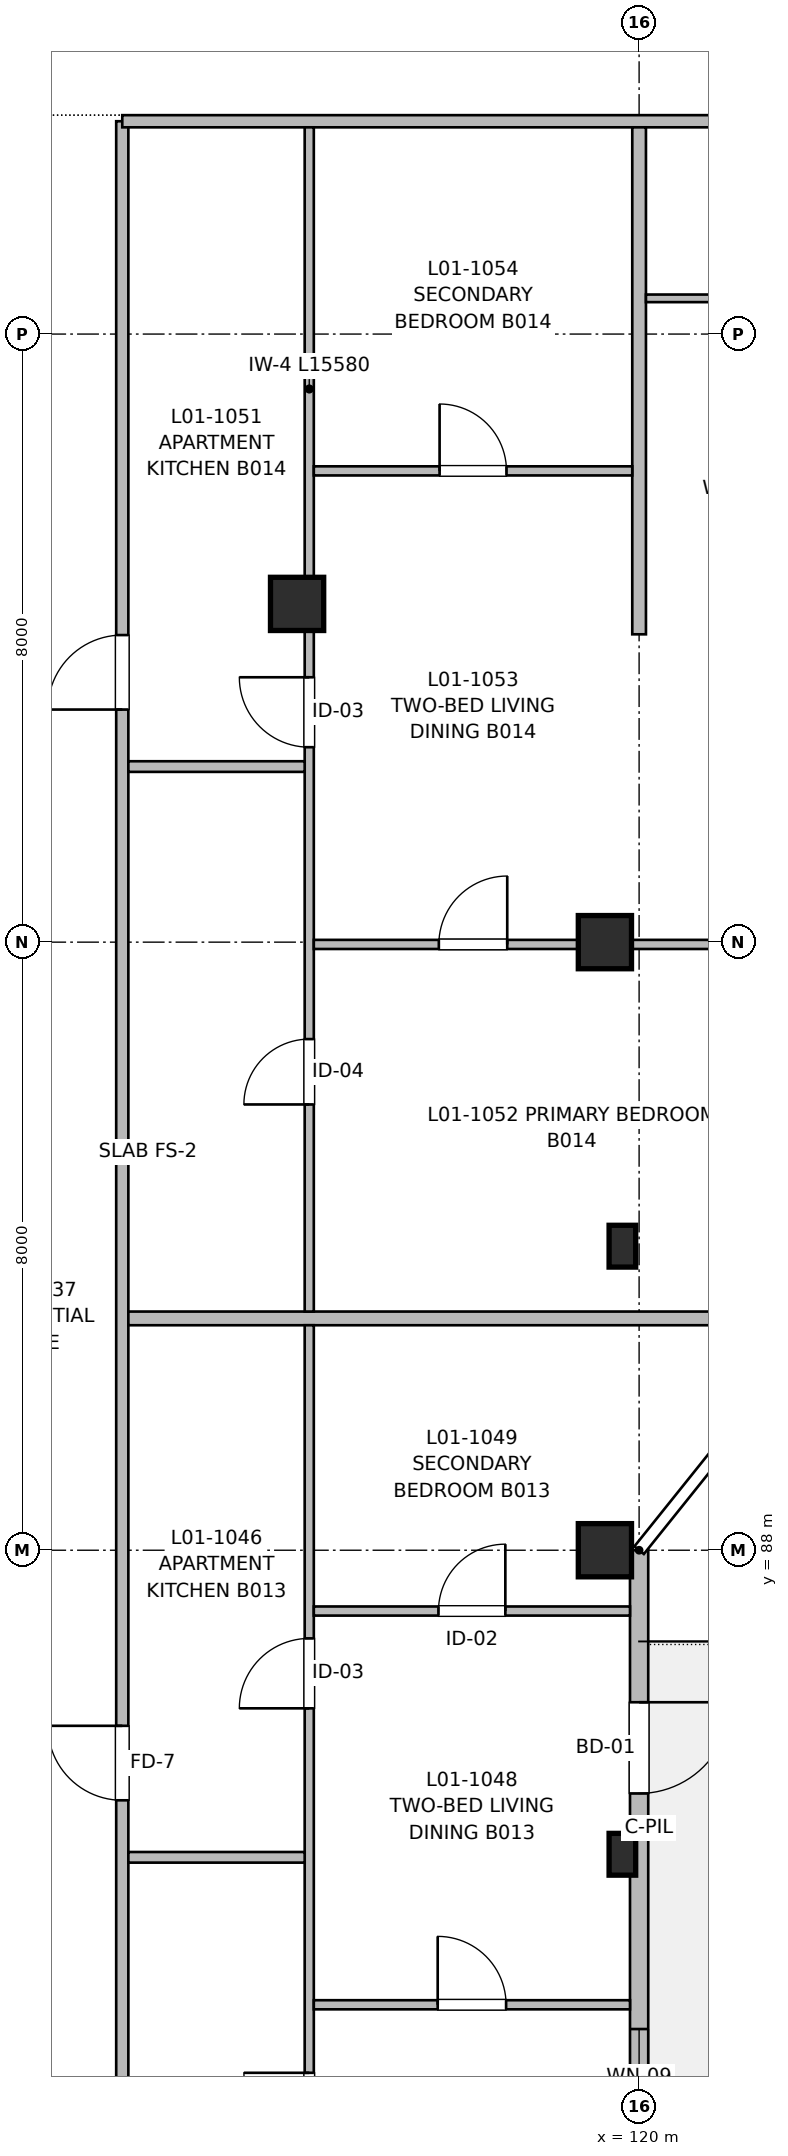
"""IFC4 building model, lengths in metres.
Left out: names, types, materials, properties, quantities, classifications, styles, units other than length and angle.
Written with IfcOpenShell. Run it as: python <this file> out.ifc"""

import sys

from ifc_helpers import new_model, si_unit, direction, frame, frame_2d, origin, origin_2d, place, context, subcontext, project, spatial, rectangle, extrude, element, fill, save


model = new_model("IFC4")
c1 = context("Model", 3, precision=1e-05, world=origin(), true_north=direction((0.0, 1.0)))
c2 = subcontext(c1, "Body", "Model", "MODEL_VIEW")
j1 = project(units=[si_unit("LENGTHUNIT", "METRE"), si_unit("PLANEANGLEUNIT", "RADIAN")], contexts=[c1])
p1 = place(None, origin())
s1 = spatial("IfcSite", under=j1, at=p1, CompositionType="ELEMENT")
p2 = place(p1, origin())
s2 = spatial("IfcBuilding", under=s1, at=p2, CompositionType="ELEMENT")
p3 = place(p2, frame((0.0, 0.0, 4.16)))
s3 = spatial("IfcBuildingStorey", under=s2, at=p3, CompositionType="ELEMENT", Elevation=4.16)
for number, where, z_axis, x_axis in (
    (1, (115.5, 100.45, 0.0), (0.0, 0.0, 1.0), (1.0, 0.0, 0.0)),
    (2, (119.55, 88.0, 0.0), (0.0, 0.0, 1.0), (1.0, 0.0, 0.0)),
    (3, (119.55, 96.0, 0.0), (0.0, 0.0, 1.0), (1.0, 0.0, 0.0)),
):
    element("IfcColumn", number, at=place(p3, frame(where, z_axis=z_axis, x_axis=x_axis)), inside=s3, PredefinedType="COLUMN", context=c2, shape_type="SweptSolid", body=[
        extrude(rectangle(XDim=0.7, YDim=0.7, at=origin_2d()), origin(), (0.0, 0.0, 1.0), 3.2),
    ])
for number, where, z_axis, x_axis in (
    (4, (119.78, 84.0, 0.0), (0.0, 0.0, 1.0), (1.0, 0.0, 0.0)),
    (5, (119.78, 92.0, 0.0), (0.0, 0.0, 1.0), (1.0, 0.0, 0.0)),
):
    element("IfcColumn", number, at=place(p3, frame(where, z_axis=z_axis, x_axis=x_axis)), inside=s3, PredefinedType="PILASTER", context=c2, shape_type="SweptSolid", body=[
        extrude(rectangle(XDim=0.35, YDim=0.55, at=origin_2d()), origin(), (0.0, 0.0, 1.0), 3.2),
    ])
p4 = place(p3, frame((120.0, 88.0, 0.0), z_axis=(0.0, 0.0, 1.0), x_axis=(0.0, -1.0, 0.0)))
e6 = element("IfcWall", 6, at=p4, inside=s3, PredefinedType="SOLIDWALL", context=c2, shape_type="SweptSolid", body=[
    extrude(rectangle(XDim=32.0, YDim=0.24, at=frame_2d((16.0, 0.0))), origin(), (0.0, 0.0, 1.0), 2.98),
])
p5 = place(p4, frame((2.0, 0.0, 0.0)))
e7 = element("IfcOpeningElement", 7, at=p5, cuts=e6, PredefinedType="OPENING", context=c2, shape_type="SweptSolid", body=[
    extrude(rectangle(XDim=1.2, YDim=2.2, at=frame_2d((0.6, 1.1))), frame((0.0, 0.13, 0.0), z_axis=(0.0, -1.0, 0.0), x_axis=(1.0, 0.0, 0.0)), (0.0, 0.0, 1.0), 0.26),
])
p6 = place(p4, frame((11.4, 0.0, 0.9)))
e8 = element("IfcOpeningElement", 8, at=p6, cuts=e6, PredefinedType="OPENING", context=c2, shape_type="SweptSolid", body=[
    extrude(rectangle(XDim=1.2, YDim=1.05, at=frame_2d((0.6, 0.525))), frame((0.0, 0.13, 0.0), z_axis=(0.0, -1.0, 0.0), x_axis=(1.0, 0.0, 0.0)), (0.0, 0.0, 1.0), 0.26),
])
p7 = place(p4, frame((19.675, 0.0, 0.9)))
e9 = element("IfcOpeningElement", 9, at=p7, cuts=e6, PredefinedType="OPENING", context=c2, shape_type="SweptSolid", body=[
    extrude(rectangle(XDim=0.65, YDim=0.95, at=frame_2d((0.325, 0.475))), frame((0.0, 0.13, 0.0), z_axis=(0.0, -1.0, 0.0), x_axis=(1.0, 0.0, 0.0)), (0.0, 0.0, 1.0), 0.26),
])
p8 = place(p4, frame((27.45, 0.0, 0.62)))
e10 = element("IfcOpeningElement", 10, at=p8, cuts=e6, PredefinedType="OPENING", context=c2, shape_type="SweptSolid", body=[
    extrude(rectangle(XDim=1.1, YDim=1.6, at=frame_2d((0.55, 0.8))), frame((0.0, 0.13, 0.0), z_axis=(0.0, -1.0, 0.0), x_axis=(1.0, 0.0, 0.0)), (0.0, 0.0, 1.0), 0.26),
])
p9 = place(p4, frame((6.299, 0.0, 0.87)))
e11 = element("IfcOpeningElement", 11, at=p9, cuts=e6, PredefinedType="OPENING", context=c2, shape_type="SweptSolid", body=[
    extrude(rectangle(XDim=1.25, YDim=1.35, at=frame_2d((0.625, 0.675))), frame((0.0, 0.13, 0.0), z_axis=(0.0, -1.0, 0.0), x_axis=(1.0, 0.0, 0.0)), (0.0, 0.0, 1.0), 0.26),
])
p10 = place(p3, frame((113.2, 56.18, 0.0), z_axis=(0.0, 0.0, 1.0), x_axis=(0.0, 1.0, 0.0)))
e12 = element("IfcWall", 12, at=p10, inside=s3, PredefinedType="PARTITIONING", context=c2, shape_type="SweptSolid", body=[
    extrude(rectangle(XDim=50.62, YDim=0.16, at=frame_2d((25.31, 0.0))), origin(), (0.0, 0.0, 1.0), 2.935),
])
p11 = place(p10, frame((4.51, 0.0, 0.0)))
e13 = element("IfcOpeningElement", 13, at=p11, cuts=e12, PredefinedType="OPENING", context=c2, shape_type="SweptSolid", body=[
    extrude(rectangle(XDim=1.5, YDim=2.2, at=frame_2d((0.75, 1.1))), frame((0.0, 0.09, 0.0), z_axis=(0.0, -1.0, 0.0), x_axis=(1.0, 0.0, 0.0)), (0.0, 0.0, 1.0), 0.18),
])
p12 = place(p10, frame((16.48, 0.0, 0.0)))
e14 = element("IfcOpeningElement", 14, at=p12, cuts=e12, PredefinedType="OPENING", context=c2, shape_type="SweptSolid", body=[
    extrude(rectangle(XDim=1.02, YDim=2.15, at=frame_2d((0.51, 1.075))), frame((0.0, 0.09, 0.0), z_axis=(0.0, -1.0, 0.0), x_axis=(1.0, 0.0, 0.0)), (0.0, 0.0, 1.0), 0.18),
])
p13 = place(p10, frame((28.53, 0.0, 0.0)))
e15 = element("IfcOpeningElement", 15, at=p13, cuts=e12, PredefinedType="OPENING", context=c2, shape_type="SweptSolid", body=[
    extrude(rectangle(XDim=0.98, YDim=2.15, at=frame_2d((0.49, 1.075))), frame((0.0, 0.09, 0.0), z_axis=(0.0, -1.0, 0.0), x_axis=(1.0, 0.0, 0.0)), (0.0, 0.0, 1.0), 0.18),
])
p14 = place(p10, frame((42.88, 0.0, 0.0)))
e16 = element("IfcOpeningElement", 16, at=p14, cuts=e12, PredefinedType="OPENING", context=c2, shape_type="SweptSolid", body=[
    extrude(rectangle(XDim=0.98, YDim=2.15, at=frame_2d((0.49, 1.075))), frame((0.0, 0.09, 0.0), z_axis=(0.0, -1.0, 0.0), x_axis=(1.0, 0.0, 0.0)), (0.0, 0.0, 1.0), 0.18),
])
p15 = place(p3, frame((113.2, 106.8, 0.0), z_axis=(0.0, 0.0, 1.0), x_axis=(1.0, 0.0, 0.0)))
e17 = element("IfcWall", 17, at=p15, inside=s3, PredefinedType="PARTITIONING", context=c2, shape_type="SweptSolid", body=[
    extrude(rectangle(XDim=24.12, YDim=0.16, at=frame_2d((12.06, 0.0))), origin(), (0.0, 0.0, 1.0), 2.935),
])
p16 = place(p15, frame((19.575, 0.0, 0.0)))
e18 = element("IfcOpeningElement", 18, at=p16, cuts=e17, PredefinedType="OPENING", context=c2, shape_type="SweptSolid", body=[
    extrude(rectangle(XDim=1.05, YDim=2.15, at=frame_2d((0.525, 1.075))), frame((0.0, 0.09, 0.0), z_axis=(0.0, -1.0, 0.0), x_axis=(1.0, 0.0, 0.0)), (0.0, 0.0, 1.0), 0.18),
])
p17 = place(p15, frame((8.995, 0.0, 0.0)))
e19 = element("IfcOpeningElement", 19, at=p17, cuts=e17, PredefinedType="OPENING", context=c2, shape_type="SweptSolid", body=[
    extrude(rectangle(XDim=0.98, YDim=2.15, at=frame_2d((0.49, 1.075))), frame((0.0, 0.09, 0.0), z_axis=(0.0, -1.0, 0.0), x_axis=(1.0, 0.0, 0.0)), (0.0, 0.0, 1.0), 0.18),
])
p18 = place(p3, frame((120.0, 100.05, 0.0), z_axis=(0.0, 0.0, 1.0), x_axis=(0.0, 1.0, 0.0)))
e20 = element("IfcWall", 20, at=p18, inside=s3, PredefinedType="PARTITIONING", context=c2, shape_type="SweptSolid", body=[
    extrude(rectangle(XDim=6.67, YDim=0.18, at=frame_2d((3.335, 0.0))), origin(), (0.0, 0.0, 1.0), 2.935),
])
p19 = place(p3, frame((113.28, 91.05, 0.0), z_axis=(0.0, 0.0, 1.0), x_axis=(1.0, 0.0, 0.0)))
e21 = element("IfcWall", 21, at=p19, inside=s3, PredefinedType="PARTITIONING", context=c2, shape_type="SweptSolid", body=[
    extrude(rectangle(XDim=9.115, YDim=0.18, at=frame_2d((4.558, 0.0))), origin(), (0.0, 0.0, 1.0), 2.935),
])
p20 = place(p3, frame((115.66, 78.0, 0.0), z_axis=(0.0, 0.0, 1.0), x_axis=(0.0, 1.0, 0.0)))
e22 = element("IfcWall", 22, at=p20, inside=s3, PredefinedType="PARTITIONING", context=c2, shape_type="SweptSolid", body=[
    extrude(rectangle(XDim=12.96, YDim=0.12, at=frame_2d((6.48, 0.0))), origin(), (0.0, 0.0, 1.0), 2.935),
])
p21 = place(p20, frame((2.265, 0.0, 0.0)))
e23 = element("IfcOpeningElement", 23, at=p21, cuts=e22, PredefinedType="OPENING", context=c2, shape_type="SweptSolid", body=[
    extrude(rectangle(XDim=0.86, YDim=2.1, at=frame_2d((0.43, 1.05))), frame((0.0, 0.07, 0.0), z_axis=(0.0, -1.0, 0.0), x_axis=(1.0, 0.0, 0.0)), (0.0, 0.0, 1.0), 0.14),
])
p22 = place(p20, frame((7.92, 0.0, 0.0)))
e24 = element("IfcOpeningElement", 24, at=p22, cuts=e22, PredefinedType="OPENING", context=c2, shape_type="SweptSolid", body=[
    extrude(rectangle(XDim=0.92, YDim=2.1, at=frame_2d((0.46, 1.05))), frame((0.0, 0.07, 0.0), z_axis=(0.0, -1.0, 0.0), x_axis=(1.0, 0.0, 0.0)), (0.0, 0.0, 1.0), 0.14),
])
p23 = place(p3, frame((113.28, 83.96, 0.0), z_axis=(0.0, 0.0, 1.0), x_axis=(1.0, 0.0, 0.0)))
e25 = element("IfcWall", 25, at=p23, inside=s3, PredefinedType="PARTITIONING", context=c2, shape_type="SweptSolid", body=[
    extrude(rectangle(XDim=2.32, YDim=0.14, at=frame_2d((1.16, 0.0))), origin(), (0.0, 0.0, 1.0), 2.935),
])
p24 = place(p3, frame((115.72, 82.02, 0.0), z_axis=(0.0, 0.0, 1.0), x_axis=(1.0, 0.0, 0.0)))
e26 = element("IfcWall", 26, at=p24, inside=s3, PredefinedType="PARTITIONING", context=c2, shape_type="SweptSolid", body=[
    extrude(rectangle(XDim=4.16, YDim=0.12, at=frame_2d((2.08, 0.0))), origin(), (0.0, 0.0, 1.0), 2.935),
])
p25 = place(p24, frame((1.63, 0.0, 0.0)))
e27 = element("IfcOpeningElement", 27, at=p25, cuts=e26, PredefinedType="OPENING", context=c2, shape_type="SweptSolid", body=[
    extrude(rectangle(XDim=0.9, YDim=2.1, at=frame_2d((0.45, 1.05))), frame((0.0, 0.07, 0.0), z_axis=(0.0, -1.0, 0.0), x_axis=(1.0, 0.0, 0.0)), (0.0, 0.0, 1.0), 0.14),
])
p26 = place(p3, frame((115.72, 87.2, 0.0), z_axis=(0.0, 0.0, 1.0), x_axis=(1.0, 0.0, 0.0)))
e28 = element("IfcWall", 28, at=p26, inside=s3, PredefinedType="PARTITIONING", context=c2, shape_type="SweptSolid", body=[
    extrude(rectangle(XDim=4.16, YDim=0.12, at=frame_2d((2.08, 0.0))), origin(), (0.0, 0.0, 1.0), 2.935),
])
p27 = place(p26, frame((1.64, 0.0, 0.0)))
e29 = element("IfcOpeningElement", 29, at=p27, cuts=e28, PredefinedType="OPENING", context=c2, shape_type="SweptSolid", body=[
    extrude(rectangle(XDim=0.88, YDim=2.1, at=frame_2d((0.44, 1.05))), frame((0.0, 0.07, 0.0), z_axis=(0.0, -1.0, 0.0), x_axis=(1.0, 0.0, 0.0)), (0.0, 0.0, 1.0), 0.14),
])
p28 = place(p3, frame((115.66, 91.14, 0.0), z_axis=(0.0, 0.0, 1.0), x_axis=(0.0, 1.0, 0.0)))
e30 = element("IfcWall", 30, at=p28, inside=s3, PredefinedType="PARTITIONING", context=c2, shape_type="SweptSolid", body=[
    extrude(rectangle(XDim=15.58, YDim=0.12, at=frame_2d((7.79, 0.0))), origin(), (0.0, 0.0, 1.0), 2.68),
])
p29 = place(p28, frame((2.725, 0.0, 0.0)))
e31 = element("IfcOpeningElement", 31, at=p29, cuts=e30, PredefinedType="OPENING", context=c2, shape_type="SweptSolid", body=[
    extrude(rectangle(XDim=0.86, YDim=2.1, at=frame_2d((0.43, 1.05))), frame((0.0, 0.07, 0.0), z_axis=(0.0, -1.0, 0.0), x_axis=(1.0, 0.0, 0.0)), (0.0, 0.0, 1.0), 0.14),
])
p30 = place(p28, frame((7.425, 0.0, 0.0)))
e32 = element("IfcOpeningElement", 32, at=p30, cuts=e30, PredefinedType="OPENING", context=c2, shape_type="SweptSolid", body=[
    extrude(rectangle(XDim=0.92, YDim=2.1, at=frame_2d((0.46, 1.05))), frame((0.0, 0.07, 0.0), z_axis=(0.0, -1.0, 0.0), x_axis=(1.0, 0.0, 0.0)), (0.0, 0.0, 1.0), 0.14),
])
p31 = place(p3, frame((113.28, 98.31, 0.0), z_axis=(0.0, 0.0, 1.0), x_axis=(1.0, 0.0, 0.0)))
e33 = element("IfcWall", 33, at=p31, inside=s3, PredefinedType="PARTITIONING", context=c2, shape_type="SweptSolid", body=[
    extrude(rectangle(XDim=2.32, YDim=0.14, at=frame_2d((1.16, 0.0))), origin(), (0.0, 0.0, 1.0), 2.935),
])
p32 = place(p3, frame((115.72, 95.97, 0.0), z_axis=(0.0, 0.0, 1.0), x_axis=(1.0, 0.0, 0.0)))
e34 = element("IfcWall", 34, at=p32, inside=s3, PredefinedType="PARTITIONING", context=c2, shape_type="SweptSolid", body=[
    extrude(rectangle(XDim=11.317, YDim=0.12, at=frame_2d((5.659, 0.0))), origin(), (0.0, 0.0, 1.0), 2.53),
])
p33 = place(p32, frame((1.645, 0.0, 0.0)))
e35 = element("IfcOpeningElement", 35, at=p33, cuts=e34, PredefinedType="OPENING", context=c2, shape_type="SweptSolid", body=[
    extrude(rectangle(XDim=0.9, YDim=2.1, at=frame_2d((0.45, 1.05))), frame((0.0, 0.07, 0.0), z_axis=(0.0, -1.0, 0.0), x_axis=(1.0, 0.0, 0.0)), (0.0, 0.0, 1.0), 0.14),
])
p34 = place(p3, frame((115.72, 102.2, 0.0), z_axis=(0.0, 0.0, 1.0), x_axis=(1.0, 0.0, 0.0)))
e36 = element("IfcWall", 36, at=p34, inside=s3, PredefinedType="PARTITIONING", context=c2, shape_type="SweptSolid", body=[
    extrude(rectangle(XDim=4.19, YDim=0.12, at=frame_2d((2.095, 0.0))), origin(), (0.0, 0.0, 1.0), 2.935),
])
p35 = place(p34, frame((1.655, 0.0, 0.0)))
e37 = element("IfcOpeningElement", 37, at=p35, cuts=e36, PredefinedType="OPENING", context=c2, shape_type="SweptSolid", body=[
    extrude(rectangle(XDim=0.88, YDim=2.1, at=frame_2d((0.44, 1.05))), frame((0.0, 0.07, 0.0), z_axis=(0.0, -1.0, 0.0), x_axis=(1.0, 0.0, 0.0)), (0.0, 0.0, 1.0), 0.14),
])
p36 = place(p3, frame((120.09, 104.47, 0.0), z_axis=(0.0, 0.0, 1.0), x_axis=(1.0, 0.0, 0.0)))
e38 = element("IfcWall", 38, at=p36, inside=s3, PredefinedType="PARTITIONING", context=c2, shape_type="SweptSolid", body=[
    extrude(rectangle(XDim=5.13, YDim=0.1, at=frame_2d((2.565, 0.0))), origin(), (0.0, 0.0, 1.0), 2.935),
])
p37 = place(p36, frame((2.18, 0.0, 0.0)))
e39 = element("IfcOpeningElement", 39, at=p37, cuts=e38, PredefinedType="OPENING", context=c2, shape_type="SweptSolid", body=[
    extrude(rectangle(XDim=0.92, YDim=2.1, at=frame_2d((0.46, 1.05))), frame((0.0, 0.06, 0.0), z_axis=(0.0, -1.0, 0.0), x_axis=(1.0, 0.0, 0.0)), (0.0, 0.0, 1.0), 0.12),
])
p38 = place(p5, origin())
e40 = element("IfcDoor", 40, at=p38, inside=s3, OperationType="SINGLE_SWING_LEFT", PredefinedType="DOOR", context=c2, shape_type="SweptSolid", body=[
    extrude(rectangle(XDim=1.2, YDim=2.2, at=frame_2d((0.6, 1.1))), frame((0.0, 0.025, 0.0), z_axis=(0.0, -1.0, 0.0), x_axis=(1.0, 0.0, 0.0)), (0.0, 0.0, 1.0), 0.05),
])
fill(e7, e40)
p39 = place(p21, origin())
e41 = element("IfcDoor", 41, at=p39, inside=s3, OperationType="SINGLE_SWING_RIGHT", PredefinedType="DOOR", context=c2, shape_type="SweptSolid", body=[
    extrude(rectangle(XDim=0.86, YDim=2.1, at=frame_2d((0.43, 1.05))), frame((0.0, 0.025, 0.0), z_axis=(0.0, -1.0, 0.0), x_axis=(1.0, 0.0, 0.0)), (0.0, 0.0, 1.0), 0.05),
])
fill(e23, e41)
p40 = place(p22, origin())
e42 = element("IfcDoor", 42, at=p40, inside=s3, OperationType="SINGLE_SWING_LEFT", PredefinedType="DOOR", context=c2, shape_type="SweptSolid", body=[
    extrude(rectangle(XDim=0.92, YDim=2.1, at=frame_2d((0.46, 1.05))), frame((0.0, 0.025, 0.0), z_axis=(0.0, -1.0, 0.0), x_axis=(1.0, 0.0, 0.0)), (0.0, 0.0, 1.0), 0.05),
])
fill(e24, e42)
p41 = place(p13, origin())
e43 = element("IfcDoor", 43, at=p41, inside=s3, OperationType="SINGLE_SWING_RIGHT", PredefinedType="DOOR", context=c2, shape_type="SweptSolid", body=[
    extrude(rectangle(XDim=0.98, YDim=2.15, at=frame_2d((0.49, 1.075))), frame((0.0, 0.025, 0.0), z_axis=(0.0, -1.0, 0.0), x_axis=(1.0, 0.0, 0.0)), (0.0, 0.0, 1.0), 0.05),
])
fill(e15, e43)
p42 = place(p25, origin())
e44 = element("IfcDoor", 44, at=p42, inside=s3, OperationType="SINGLE_SWING_LEFT", PredefinedType="DOOR", context=c2, shape_type="SweptSolid", body=[
    extrude(rectangle(XDim=0.9, YDim=2.1, at=frame_2d((0.45, 1.05))), frame((0.0, 0.025, 0.0), z_axis=(0.0, -1.0, 0.0), x_axis=(1.0, 0.0, 0.0)), (0.0, 0.0, 1.0), 0.05),
])
fill(e27, e44)
p43 = place(p27, origin())
e45 = element("IfcDoor", 45, at=p43, inside=s3, OperationType="SINGLE_SWING_RIGHT", PredefinedType="DOOR", context=c2, shape_type="SweptSolid", body=[
    extrude(rectangle(XDim=0.88, YDim=2.1, at=frame_2d((0.44, 1.05))), frame((0.0, 0.025, 0.0), z_axis=(0.0, -1.0, 0.0), x_axis=(1.0, 0.0, 0.0)), (0.0, 0.0, 1.0), 0.05),
])
fill(e29, e45)
p44 = place(p29, origin())
e46 = element("IfcDoor", 46, at=p44, inside=s3, OperationType="SINGLE_SWING_LEFT", PredefinedType="DOOR", context=c2, shape_type="SweptSolid", body=[
    extrude(rectangle(XDim=0.86, YDim=2.1, at=frame_2d((0.43, 1.05))), frame((0.0, 0.025, 0.0), z_axis=(0.0, -1.0, 0.0), x_axis=(1.0, 0.0, 0.0)), (0.0, 0.0, 1.0), 0.05),
])
fill(e31, e46)
p45 = place(p30, origin())
e47 = element("IfcDoor", 47, at=p45, inside=s3, OperationType="SINGLE_SWING_RIGHT", PredefinedType="DOOR", context=c2, shape_type="SweptSolid", body=[
    extrude(rectangle(XDim=0.92, YDim=2.1, at=frame_2d((0.46, 1.05))), frame((0.0, 0.025, 0.0), z_axis=(0.0, -1.0, 0.0), x_axis=(1.0, 0.0, 0.0)), (0.0, 0.0, 1.0), 0.05),
])
fill(e32, e47)
p46 = place(p14, origin())
e48 = element("IfcDoor", 48, at=p46, inside=s3, OperationType="SINGLE_SWING_LEFT", PredefinedType="DOOR", context=c2, shape_type="SweptSolid", body=[
    extrude(rectangle(XDim=0.98, YDim=2.15, at=frame_2d((0.49, 1.075))), frame((0.0, 0.025, 0.0), z_axis=(0.0, -1.0, 0.0), x_axis=(1.0, 0.0, 0.0)), (0.0, 0.0, 1.0), 0.05),
])
fill(e16, e48)
p47 = place(p33, origin())
e49 = element("IfcDoor", 49, at=p47, inside=s3, OperationType="SINGLE_SWING_RIGHT", PredefinedType="DOOR", context=c2, shape_type="SweptSolid", body=[
    extrude(rectangle(XDim=0.9, YDim=2.1, at=frame_2d((0.45, 1.05))), frame((0.0, 0.025, 0.0), z_axis=(0.0, -1.0, 0.0), x_axis=(1.0, 0.0, 0.0)), (0.0, 0.0, 1.0), 0.05),
])
fill(e35, e49)
p48 = place(p35, origin())
e50 = element("IfcDoor", 50, at=p48, inside=s3, OperationType="SINGLE_SWING_LEFT", PredefinedType="DOOR", context=c2, shape_type="SweptSolid", body=[
    extrude(rectangle(XDim=0.88, YDim=2.1, at=frame_2d((0.44, 1.05))), frame((0.0, 0.025, 0.0), z_axis=(0.0, -1.0, 0.0), x_axis=(1.0, 0.0, 0.0)), (0.0, 0.0, 1.0), 0.05),
])
fill(e37, e50)
p49 = place(p9, origin())
e51 = element("IfcWindow", 51, at=p49, inside=s3, PartitioningType="SINGLE_PANEL", PredefinedType="WINDOW", context=c2, shape_type="SweptSolid", body=[
    extrude(rectangle(XDim=1.25, YDim=1.35, at=frame_2d((0.625, 0.675))), frame((0.0, 0.03, 0.0), z_axis=(0.0, -1.0, 0.0), x_axis=(1.0, 0.0, 0.0)), (0.0, 0.0, 1.0), 0.06),
])
fill(e11, e51)
save(model, sys.argv[1])
